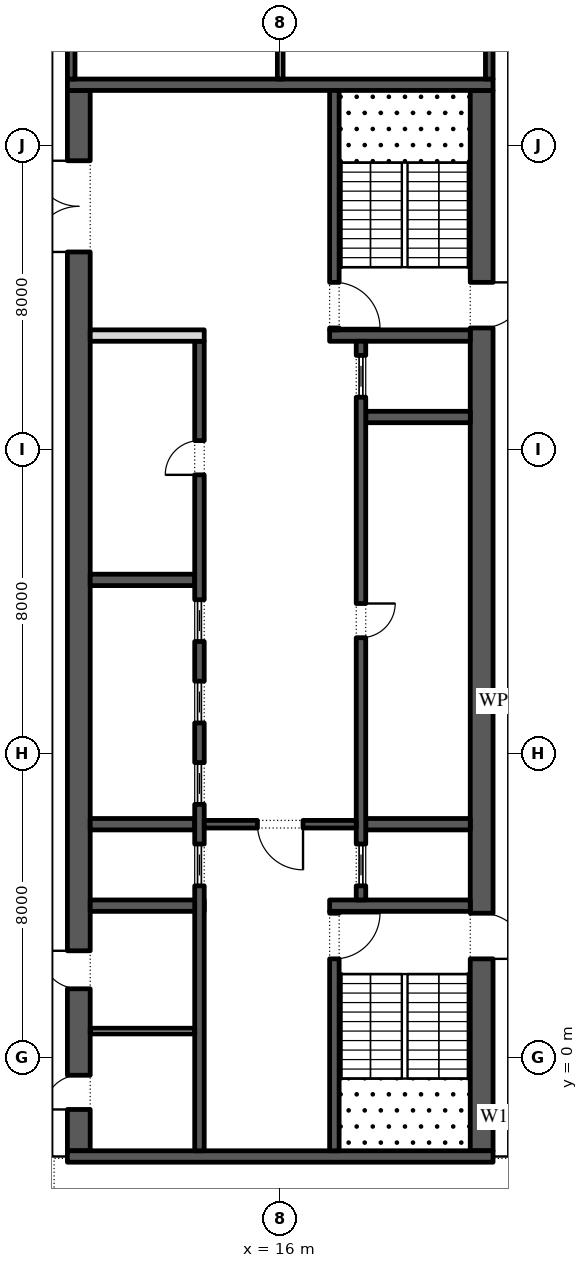
"""IFC4 building model, lengths in metres.
Left out: names, types, materials, properties, quantities, classifications, styles, units other than length and angle.
Written with IfcOpenShell. Run it as: python <this file> out.ifc"""

import sys

from ifc_helpers import new_model, si_unit, direction, frame, frame_2d, origin, place, context, subcontext, project, spatial, rectangle, extrude, element, fill, save


model = new_model("IFC4")
c1 = context("Model", 3, precision=1e-05, world=origin(), true_north=direction((0.0, 1.0)))
c2 = subcontext(c1, "Body", "Model", "MODEL_VIEW")
j1 = project(units=[si_unit("LENGTHUNIT", "METRE"), si_unit("PLANEANGLEUNIT", "RADIAN")], contexts=[c1])
p1 = place(None, origin())
s1 = spatial("IfcSite", under=j1, at=p1, CompositionType="ELEMENT")
p2 = place(p1, origin())
s2 = spatial("IfcBuilding", under=s1, at=p2, CompositionType="ELEMENT")
p3 = place(p2, frame((0.0, 0.0, 272.4)))
s3 = spatial("IfcBuildingStorey", under=s2, at=p3, CompositionType="ELEMENT", Elevation=272.4)
p4 = place(p3, frame((21.359, -11.678, 0.0), z_axis=(0.0, 0.0, 1.0), x_axis=(0.224949198343, 0.974370493275, 0.0)))
e1 = element("IfcWall", 1, at=p4, inside=s3, PredefinedType="STANDARD", context=c2, shape_type="SweptSolid", body=[
    extrude(rectangle(XDim=49.5, YDim=0.3, at=frame_2d((24.75, 0.0))), origin(), (0.0, 0.0, 1.0), 4.0),
])
p5 = place(p4, frame((1.157, 0.0, 0.45)))
e2 = element("IfcOpeningElement", 2, at=p5, cuts=e1, PredefinedType="OPENING", context=c2, shape_type="SweptSolid", body=[
    extrude(rectangle(XDim=4.5, YDim=3.05, at=frame_2d((2.25, 1.525))), frame((0.0, 0.16, 0.0), z_axis=(0.0, -1.0, 0.0), x_axis=(1.0, 0.0, 0.0)), (0.0, 0.0, 1.0), 0.32),
])
p6 = place(p4, frame((8.121, 0.0, 0.45)))
e3 = element("IfcOpeningElement", 3, at=p6, cuts=e1, PredefinedType="OPENING", context=c2, shape_type="SweptSolid", body=[
    extrude(rectangle(XDim=4.5, YDim=3.05, at=frame_2d((2.25, 1.525))), frame((0.0, 0.16, 0.0), z_axis=(0.0, -1.0, 0.0), x_axis=(1.0, 0.0, 0.0)), (0.0, 0.0, 1.0), 0.32),
])
p7 = place(p4, frame((15.236, 0.0, 0.45)))
e4 = element("IfcOpeningElement", 4, at=p7, cuts=e1, PredefinedType="OPENING", context=c2, shape_type="SweptSolid", body=[
    extrude(rectangle(XDim=4.5, YDim=3.05, at=frame_2d((2.25, 1.525))), frame((0.0, 0.16, 0.0), z_axis=(0.0, -1.0, 0.0), x_axis=(1.0, 0.0, 0.0)), (0.0, 0.0, 1.0), 0.32),
])
p8 = place(p4, frame((22.35, 0.0, 0.45)))
e5 = element("IfcOpeningElement", 5, at=p8, cuts=e1, PredefinedType="OPENING", context=c2, shape_type="SweptSolid", body=[
    extrude(rectangle(XDim=4.5, YDim=3.05, at=frame_2d((2.25, 1.525))), frame((0.0, 0.16, 0.0), z_axis=(0.0, -1.0, 0.0), x_axis=(1.0, 0.0, 0.0)), (0.0, 0.0, 1.0), 0.32),
])
p9 = place(p4, frame((29.464, 0.0, 0.45)))
e6 = element("IfcOpeningElement", 6, at=p9, cuts=e1, PredefinedType="OPENING", context=c2, shape_type="SweptSolid", body=[
    extrude(rectangle(XDim=4.5, YDim=2.95, at=frame_2d((2.25, 1.475))), frame((0.0, 0.16, 0.0), z_axis=(0.0, -1.0, 0.0), x_axis=(1.0, 0.0, 0.0)), (0.0, 0.0, 1.0), 0.32),
])
p10 = place(p4, frame((37.628, 0.0, 0.0)))
e7 = element("IfcOpeningElement", 7, at=p10, cuts=e1, PredefinedType="OPENING", context=c2, shape_type="SweptSolid", body=[
    extrude(rectangle(XDim=2.4, YDim=3.325, at=frame_2d((1.2, 1.663))), frame((0.0, 0.16, 0.0), z_axis=(0.0, -1.0, 0.0), x_axis=(1.0, 0.0, 0.0)), (0.0, 0.0, 1.0), 0.32),
])
p11 = place(p4, frame((43.693, 0.0, 0.45)))
e8 = element("IfcOpeningElement", 8, at=p11, cuts=e1, PredefinedType="OPENING", context=c2, shape_type="SweptSolid", body=[
    extrude(rectangle(XDim=4.5, YDim=3.05, at=frame_2d((2.25, 1.525))), frame((0.0, 0.16, 0.0), z_axis=(0.0, -1.0, 0.0), x_axis=(1.0, 0.0, 0.0)), (0.0, 0.0, 1.0), 0.32),
])
p12 = place(p3, frame((21.3, -2.45, 0.0), z_axis=(0.0, 0.0, 1.0), x_axis=(0.0, 1.0, 0.0)))
e9 = element("IfcWall", 9, at=p12, inside=s3, PredefinedType="SHEAR", context=c2, shape_type="SweptSolid", body=[
    extrude(rectangle(XDim=27.9, YDim=0.6, at=frame_2d((13.95, 0.0))), origin(), (0.0, 0.0, 1.0), 4.0),
])
p13 = place(p12, frame((5.05, 0.0, 0.0)))
e10 = element("IfcOpeningElement", 10, at=p13, cuts=e9, PredefinedType="OPENING", context=c2, shape_type="SweptSolid", body=[
    extrude(rectangle(XDim=1.2, YDim=2.1, at=frame_2d((0.6, 1.05))), frame((0.0, 0.31, 0.0), z_axis=(0.0, -1.0, 0.0), x_axis=(1.0, 0.0, 0.0)), (0.0, 0.0, 1.0), 0.62),
])
p14 = place(p12, frame((21.65, 0.0, 0.0)))
e11 = element("IfcOpeningElement", 11, at=p14, cuts=e9, PredefinedType="OPENING", context=c2, shape_type="SweptSolid", body=[
    extrude(rectangle(XDim=1.2, YDim=2.1, at=frame_2d((0.6, 1.05))), frame((0.0, 0.31, 0.0), z_axis=(0.0, -1.0, 0.0), x_axis=(1.0, 0.0, 0.0)), (0.0, 0.0, 1.0), 0.62),
])
p15 = place(p3, frame((10.7, -2.45, 0.0), z_axis=(0.0, 0.0, 1.0), x_axis=(0.0, 1.0, 0.0)))
e12 = element("IfcWall", 12, at=p15, inside=s3, PredefinedType="SHEAR", context=c2, shape_type="SweptSolid", body=[
    extrude(rectangle(XDim=27.9, YDim=0.6, at=frame_2d((13.95, 0.0))), origin(), (0.0, 0.0, 1.0), 4.0),
])
p16 = place(p15, frame((23.65, 0.0, 0.0)))
e13 = element("IfcOpeningElement", 13, at=p16, cuts=e12, PredefinedType="OPENING", context=c2, shape_type="SweptSolid", body=[
    extrude(rectangle(XDim=2.4, YDim=2.1, at=frame_2d((1.2, 1.05))), frame((0.0, 0.31, 0.0), z_axis=(0.0, -1.0, 0.0), x_axis=(1.0, 0.0, 0.0)), (0.0, 0.0, 1.0), 0.62),
])
p17 = place(p15, frame((1.087, 0.0, 0.0)))
e14 = element("IfcOpeningElement", 14, at=p17, cuts=e12, PredefinedType="OPENING", context=c2, shape_type="SweptSolid", body=[
    extrude(rectangle(XDim=0.9, YDim=2.1, at=frame_2d((0.45, 1.05))), frame((0.0, 0.31, 0.0), z_axis=(0.0, -1.0, 0.0), x_axis=(1.0, 0.0, 0.0)), (0.0, 0.0, 1.0), 0.62),
])
p18 = place(p15, frame((4.262, 0.0, 0.0)))
e15 = element("IfcOpeningElement", 15, at=p18, cuts=e12, PredefinedType="OPENING", context=c2, shape_type="SweptSolid", body=[
    extrude(rectangle(XDim=1.0, YDim=2.1, at=frame_2d((0.5, 1.05))), frame((0.0, 0.31, 0.0), z_axis=(0.0, -1.0, 0.0), x_axis=(1.0, 0.0, 0.0)), (0.0, 0.0, 1.0), 0.62),
])
for number, where, z_axis, x_axis in (
    (16, (10.4, -2.6, 0.0), (0.0, 0.0, 1.0), (1.0, 0.0, 0.0)),
    (17, (10.4, 25.6, 0.0), (0.0, 0.0, 1.0), (1.0, 0.0, 0.0)),
):
    element("IfcWall", number, at=place(p3, frame(where, z_axis=z_axis, x_axis=x_axis)), inside=s3, PredefinedType="SHEAR", context=c2, shape_type="SweptSolid", body=[
        extrude(rectangle(XDim=11.2, YDim=0.3, at=frame_2d((5.6, 0.0))), origin(), (0.0, 0.0, 1.0), 4.0),
    ])
p19 = place(p3, frame((17.3, 4.0, 0.0), z_axis=(0.0, 0.0, 1.0), x_axis=(1.0, 0.0, 0.0)))
e18 = element("IfcWall", 18, at=p19, inside=s3, PredefinedType="SHEAR", context=c2, shape_type="SweptSolid", body=[
    extrude(rectangle(XDim=3.7, YDim=0.3, at=frame_2d((1.85, 0.0))), origin(), (0.0, 0.0, 1.0), 4.0),
])
p20 = place(p3, frame((17.425, -2.45, 0.0), z_axis=(0.0, 0.0, 1.0), x_axis=(0.0, 1.0, 0.0)))
e19 = element("IfcWall", 19, at=p20, inside=s3, PredefinedType="SHEAR", context=c2, shape_type="SweptSolid", body=[
    extrude(rectangle(XDim=6.3, YDim=0.25, at=frame_2d((3.15, 0.0))), origin(), (0.0, 0.0, 1.0), 4.0),
])
p21 = place(p20, frame((5.05, 0.0, 0.0)))
e20 = element("IfcOpeningElement", 20, at=p21, cuts=e19, PredefinedType="OPENING", context=c2, shape_type="SweptSolid", body=[
    extrude(rectangle(XDim=1.2, YDim=2.1, at=frame_2d((0.6, 1.05))), frame((0.0, 0.135, 0.0), z_axis=(0.0, -1.0, 0.0), x_axis=(1.0, 0.0, 0.0)), (0.0, 0.0, 1.0), 0.27),
])
p22 = place(p3, frame((17.3, 19.0, 0.0), z_axis=(0.0, 0.0, 1.0), x_axis=(1.0, 0.0, 0.0)))
e21 = element("IfcWall", 21, at=p22, inside=s3, PredefinedType="SHEAR", context=c2, shape_type="SweptSolid", body=[
    extrude(rectangle(XDim=3.7, YDim=0.3, at=frame_2d((1.85, 0.0))), origin(), (0.0, 0.0, 1.0), 4.0),
])
p23 = place(p3, frame((17.425, 19.15, 0.0), z_axis=(0.0, 0.0, 1.0), x_axis=(0.0, 1.0, 0.0)))
e22 = element("IfcWall", 22, at=p23, inside=s3, PredefinedType="SHEAR", context=c2, shape_type="SweptSolid", body=[
    extrude(rectangle(XDim=6.3, YDim=0.25, at=frame_2d((3.15, 0.0))), origin(), (0.0, 0.0, 1.0), 4.0),
])
p24 = place(p23, frame((0.05, 0.0, 0.0)))
e23 = element("IfcOpeningElement", 23, at=p24, cuts=e22, PredefinedType="OPENING", context=c2, shape_type="SweptSolid", body=[
    extrude(rectangle(XDim=1.2, YDim=2.1, at=frame_2d((0.6, 1.05))), frame((0.0, 0.135, 0.0), z_axis=(0.0, -1.0, 0.0), x_axis=(1.0, 0.0, 0.0)), (0.0, 0.0, 1.0), 0.27),
])
for number, where, z_axis, x_axis in (
    (24, (18.25, 6.143, 0.0), (0.0, 0.0, 1.0), (1.0, 0.0, 0.0)),
    (25, (18.25, 16.857, 0.0), (0.0, 0.0, 1.0), (1.0, 0.0, 0.0)),
):
    element("IfcWall", number, at=place(p3, frame(where, z_axis=z_axis, x_axis=x_axis)), inside=s3, PredefinedType="SHEAR", context=c2, shape_type="SweptSolid", body=[
        extrude(rectangle(XDim=2.75, YDim=0.3, at=frame_2d((1.375, 0.0))), origin(), (0.0, 0.0, 1.0), 4.0),
    ])
p25 = place(p3, frame((18.125, 4.15, 0.0), z_axis=(0.0, 0.0, 1.0), x_axis=(0.0, 1.0, 0.0)))
e26 = element("IfcWall", 26, at=p25, inside=s3, PredefinedType="SHEAR", context=c2, shape_type="SweptSolid", body=[
    extrude(rectangle(XDim=14.7, YDim=0.25, at=frame_2d((7.35, 0.0))), origin(), (0.0, 0.0, 1.0), 4.0),
])
p26 = place(p25, frame((6.9, 0.0, 0.0)))
e27 = element("IfcOpeningElement", 27, at=p26, cuts=e26, PredefinedType="OPENING", context=c2, shape_type="SweptSolid", body=[
    extrude(rectangle(XDim=0.9, YDim=2.1, at=frame_2d((0.45, 1.05))), frame((0.0, 0.135, 0.0), z_axis=(0.0, -1.0, 0.0), x_axis=(1.0, 0.0, 0.0)), (0.0, 0.0, 1.0), 0.27),
])
p27 = place(p25, frame((0.371, 0.0, 0.0)))
e28 = element("IfcOpeningElement", 28, at=p27, cuts=e26, PredefinedType="OPENING", context=c2, shape_type="SweptSolid", body=[
    extrude(rectangle(XDim=1.1, YDim=2.1, at=frame_2d((0.55, 1.05))), frame((0.0, 0.135, 0.0), z_axis=(0.0, -1.0, 0.0), x_axis=(1.0, 0.0, 0.0)), (0.0, 0.0, 1.0), 0.27),
])
p28 = place(p25, frame((13.229, 0.0, 0.0)))
e29 = element("IfcOpeningElement", 29, at=p28, cuts=e26, PredefinedType="OPENING", context=c2, shape_type="SweptSolid", body=[
    extrude(rectangle(XDim=1.1, YDim=2.1, at=frame_2d((0.55, 1.05))), frame((0.0, 0.135, 0.0), z_axis=(0.0, -1.0, 0.0), x_axis=(1.0, 0.0, 0.0)), (0.0, 0.0, 1.0), 0.27),
])
p29 = place(p3, frame((11.0, 4.0, 0.0), z_axis=(0.0, 0.0, 1.0), x_axis=(1.0, 0.0, 0.0)))
e30 = element("IfcWall", 30, at=p29, inside=s3, PredefinedType="SHEAR", context=c2, shape_type="SweptSolid", body=[
    extrude(rectangle(XDim=3.0, YDim=0.3, at=frame_2d((1.5, 0.0))), origin(), (0.0, 0.0, 1.0), 4.0),
])
for number, where, z_axis, x_axis in (
    (31, (11.0, 6.143, 0.0), (0.0, 0.0, 1.0), (1.0, 0.0, 0.0)),
    (32, (11.0, 12.571, 0.0), (0.0, 0.0, 1.0), (1.0, 0.0, 0.0)),
):
    element("IfcWall", number, at=place(p3, frame(where, z_axis=z_axis, x_axis=x_axis)), inside=s3, PredefinedType="SHEAR", context=c2, shape_type="SweptSolid", body=[
        extrude(rectangle(XDim=2.75, YDim=0.3, at=frame_2d((1.375, 0.0))), origin(), (0.0, 0.0, 1.0), 4.0),
    ])
p30 = place(p3, frame((13.875, -2.45, 0.0), z_axis=(0.0, 0.0, 1.0), x_axis=(0.0, 1.0, 0.0)))
e33 = element("IfcWall", 33, at=p30, inside=s3, PredefinedType="SHEAR", context=c2, shape_type="SweptSolid", body=[
    extrude(rectangle(XDim=21.3, YDim=0.25, at=frame_2d((10.65, 0.0))), origin(), (0.0, 0.0, 1.0), 4.0),
])
p31 = place(p30, frame((17.786, 0.0, 0.0)))
e34 = element("IfcOpeningElement", 34, at=p31, cuts=e33, PredefinedType="OPENING", context=c2, shape_type="SweptSolid", body=[
    extrude(rectangle(XDim=0.9, YDim=2.1, at=frame_2d((0.45, 1.05))), frame((0.0, 0.135, 0.0), z_axis=(0.0, -1.0, 0.0), x_axis=(1.0, 0.0, 0.0)), (0.0, 0.0, 1.0), 0.27),
])
p32 = place(p30, frame((6.971, 0.0, 0.0)))
e35 = element("IfcOpeningElement", 35, at=p32, cuts=e33, PredefinedType="OPENING", context=c2, shape_type="SweptSolid", body=[
    extrude(rectangle(XDim=1.1, YDim=2.1, at=frame_2d((0.55, 1.05))), frame((0.0, 0.135, 0.0), z_axis=(0.0, -1.0, 0.0), x_axis=(1.0, 0.0, 0.0)), (0.0, 0.0, 1.0), 0.27),
])
p33 = place(p30, frame((9.114, 0.0, 0.0)))
e36 = element("IfcOpeningElement", 36, at=p33, cuts=e33, PredefinedType="OPENING", context=c2, shape_type="SweptSolid", body=[
    extrude(rectangle(XDim=1.1, YDim=2.1, at=frame_2d((0.55, 1.05))), frame((0.0, 0.135, 0.0), z_axis=(0.0, -1.0, 0.0), x_axis=(1.0, 0.0, 0.0)), (0.0, 0.0, 1.0), 0.27),
])
p34 = place(p30, frame((11.257, 0.0, 0.0)))
e37 = element("IfcOpeningElement", 37, at=p34, cuts=e33, PredefinedType="OPENING", context=c2, shape_type="SweptSolid", body=[
    extrude(rectangle(XDim=1.1, YDim=2.1, at=frame_2d((0.55, 1.05))), frame((0.0, 0.135, 0.0), z_axis=(0.0, -1.0, 0.0), x_axis=(1.0, 0.0, 0.0)), (0.0, 0.0, 1.0), 0.27),
])
p35 = place(p30, frame((13.4, 0.0, 0.0)))
e38 = element("IfcOpeningElement", 38, at=p35, cuts=e33, PredefinedType="OPENING", context=c2, shape_type="SweptSolid", body=[
    extrude(rectangle(XDim=1.1, YDim=2.1, at=frame_2d((0.55, 1.05))), frame((0.0, 0.135, 0.0), z_axis=(0.0, -1.0, 0.0), x_axis=(1.0, 0.0, 0.0)), (0.0, 0.0, 1.0), 0.27),
])
p36 = place(p3, frame((11.0, 19.0, 0.0), z_axis=(0.0, 0.0, 1.0), x_axis=(1.0, 0.0, 0.0)))
e39 = element("IfcWall", 39, at=p36, inside=s3, PredefinedType="PARTITIONING", context=c2, shape_type="SweptSolid", body=[
    extrude(rectangle(XDim=3.0, YDim=0.3, at=frame_2d((1.5, 0.0))), origin(), (0.0, 0.0, 1.0), 4.0),
])
p37 = place(p3, frame((14.0, 6.143, 0.0), z_axis=(0.0, 0.0, 1.0), x_axis=(1.0, 0.0, 0.0)))
e40 = element("IfcWall", 40, at=p37, inside=s3, PredefinedType="SHEAR", context=c2, shape_type="SweptSolid", body=[
    extrude(rectangle(XDim=4.0, YDim=0.2, at=frame_2d((2.0, 0.0))), origin(), (0.0, 0.0, 1.0), 4.0),
])
p38 = place(p37, frame((1.4, 0.0, 0.0)))
e41 = element("IfcOpeningElement", 41, at=p38, cuts=e40, PredefinedType="OPENING", context=c2, shape_type="SweptSolid", body=[
    extrude(rectangle(XDim=1.2, YDim=2.1, at=frame_2d((0.6, 1.05))), frame((0.0, 0.11, 0.0), z_axis=(0.0, -1.0, 0.0), x_axis=(1.0, 0.0, 0.0)), (0.0, 0.0, 1.0), 0.22),
])
p39 = place(p3, frame((11.0, 0.7, 0.0), z_axis=(0.0, 0.0, 1.0), x_axis=(1.0, 0.0, 0.0)))
e42 = element("IfcWall", 42, at=p39, inside=s3, PredefinedType="PARTITIONING", context=c2, shape_type="SweptSolid", body=[
    extrude(rectangle(XDim=2.75, YDim=0.15, at=frame_2d((1.375, 0.0))), origin(), (0.0, 0.0, 1.0), 4.0),
])
p40 = place(p3, frame((21.5, 25.75, 0.0), z_axis=(0.0, 0.0, 1.0), x_axis=(0.0, 1.0, 0.0)))
e43 = element("IfcWall", 43, at=p40, inside=s3, PredefinedType="SHEAR", context=c2, shape_type="SweptSolid", body=[
    extrude(rectangle(XDim=4.75, YDim=0.2, at=frame_2d((2.375, 0.0))), origin(), (0.0, 0.0, 1.0), 4.0),
])
p41 = place(p40, frame((1.925, 0.0, 0.0)))
e44 = element("IfcOpeningElement", 44, at=p41, cuts=e43, PredefinedType="OPENING", context=c2, shape_type="SweptSolid", body=[
    extrude(rectangle(XDim=0.9, YDim=2.1, at=frame_2d((0.45, 1.05))), frame((0.0, 0.11, 0.0), z_axis=(0.0, -1.0, 0.0), x_axis=(1.0, 0.0, 0.0)), (0.0, 0.0, 1.0), 0.22),
])
p42 = place(p3, frame((10.5, 25.75, 0.0), z_axis=(0.0, 0.0, 1.0), x_axis=(0.0, 1.0, 0.0)))
e45 = element("IfcWall", 45, at=p42, inside=s3, PredefinedType="SHEAR", context=c2, shape_type="SweptSolid", body=[
    extrude(rectangle(XDim=4.75, YDim=0.2, at=frame_2d((2.375, 0.0))), origin(), (0.0, 0.0, 1.0), 4.0),
])
p43 = place(p42, frame((1.925, 0.0, 0.0)))
e46 = element("IfcOpeningElement", 46, at=p43, cuts=e45, PredefinedType="OPENING", context=c2, shape_type="SweptSolid", body=[
    extrude(rectangle(XDim=0.9, YDim=2.1, at=frame_2d((0.45, 1.05))), frame((0.0, 0.11, 0.0), z_axis=(0.0, -1.0, 0.0), x_axis=(1.0, 0.0, 0.0)), (0.0, 0.0, 1.0), 0.22),
])
p44 = place(p3, frame((16.0, 25.75, 0.0), z_axis=(0.0, 0.0, 1.0), x_axis=(0.0, 1.0, 0.0)))
e47 = element("IfcWall", 47, at=p44, inside=s3, PredefinedType="PARTITIONING", context=c2, shape_type="SweptSolid", body=[
    extrude(rectangle(XDim=4.75, YDim=0.15, at=frame_2d((2.375, 0.0))), origin(), (0.0, 0.0, 1.0), 4.0),
])
p45 = place(p26, frame((0.9, -0.2, 0.0), z_axis=(0.0, 0.0, 1.0), x_axis=(-1.0, 0.0, 0.0)))
e48 = element("IfcDoor", 48, at=p45, inside=s3, OperationType="SINGLE_SWING_RIGHT", PredefinedType="DOOR", context=c2, shape_type="SweptSolid", body=[
    extrude(rectangle(XDim=0.9, YDim=2.1, at=frame_2d((0.45, 1.05))), frame((0.0, -0.075, 0.0), z_axis=(0.0, -1.0, 0.0), x_axis=(1.0, 0.0, 0.0)), (0.0, 0.0, 1.0), 0.05),
])
fill(e27, e48)
p46 = place(p27, origin())
e49 = element("IfcDoor", 49, at=p46, inside=s3, OperationType="SLIDING_TO_LEFT", PredefinedType="DOOR", context=c2, shape_type="SweptSolid", body=[
    extrude(rectangle(XDim=1.1, YDim=2.1, at=frame_2d((0.55, 1.05))), frame((0.0, 0.025, 0.0), z_axis=(0.0, -1.0, 0.0), x_axis=(1.0, 0.0, 0.0)), (0.0, 0.0, 1.0), 0.05),
])
fill(e28, e49)
p47 = place(p28, origin())
e50 = element("IfcDoor", 50, at=p47, inside=s3, OperationType="SLIDING_TO_LEFT", PredefinedType="DOOR", context=c2, shape_type="SweptSolid", body=[
    extrude(rectangle(XDim=1.1, YDim=2.1, at=frame_2d((0.55, 1.05))), frame((0.0, 0.025, 0.0), z_axis=(0.0, -1.0, 0.0), x_axis=(1.0, 0.0, 0.0)), (0.0, 0.0, 1.0), 0.05),
])
fill(e29, e50)
p48 = place(p31, origin())
e51 = element("IfcDoor", 51, at=p48, inside=s3, OperationType="SINGLE_SWING_RIGHT", PredefinedType="DOOR", context=c2, shape_type="SweptSolid", body=[
    extrude(rectangle(XDim=0.9, YDim=2.1, at=frame_2d((0.45, 1.05))), frame((0.0, 0.125, 0.0), z_axis=(0.0, -1.0, 0.0), x_axis=(1.0, 0.0, 0.0)), (0.0, 0.0, 1.0), 0.05),
])
fill(e34, e51)
p49 = place(p32, origin())
e52 = element("IfcDoor", 52, at=p49, inside=s3, OperationType="SLIDING_TO_LEFT", PredefinedType="DOOR", context=c2, shape_type="SweptSolid", body=[
    extrude(rectangle(XDim=1.1, YDim=2.1, at=frame_2d((0.55, 1.05))), frame((0.0, 0.025, 0.0), z_axis=(0.0, -1.0, 0.0), x_axis=(1.0, 0.0, 0.0)), (0.0, 0.0, 1.0), 0.05),
])
fill(e35, e52)
p50 = place(p33, origin())
e53 = element("IfcDoor", 53, at=p50, inside=s3, OperationType="SLIDING_TO_LEFT", PredefinedType="DOOR", context=c2, shape_type="SweptSolid", body=[
    extrude(rectangle(XDim=1.1, YDim=2.1, at=frame_2d((0.55, 1.05))), frame((0.0, 0.025, 0.0), z_axis=(0.0, -1.0, 0.0), x_axis=(1.0, 0.0, 0.0)), (0.0, 0.0, 1.0), 0.05),
])
fill(e36, e53)
p51 = place(p34, origin())
e54 = element("IfcDoor", 54, at=p51, inside=s3, OperationType="SLIDING_TO_LEFT", PredefinedType="DOOR", context=c2, shape_type="SweptSolid", body=[
    extrude(rectangle(XDim=1.1, YDim=2.1, at=frame_2d((0.55, 1.05))), frame((0.0, 0.025, 0.0), z_axis=(0.0, -1.0, 0.0), x_axis=(1.0, 0.0, 0.0)), (0.0, 0.0, 1.0), 0.05),
])
fill(e37, e54)
p52 = place(p35, origin())
e55 = element("IfcDoor", 55, at=p52, inside=s3, OperationType="SLIDING_TO_LEFT", PredefinedType="DOOR", context=c2, shape_type="SweptSolid", body=[
    extrude(rectangle(XDim=1.1, YDim=2.1, at=frame_2d((0.55, 1.05))), frame((0.0, 0.025, 0.0), z_axis=(0.0, -1.0, 0.0), x_axis=(1.0, 0.0, 0.0)), (0.0, 0.0, 1.0), 0.05),
])
fill(e38, e55)
p53 = place(p38, frame((1.2, 0.0, 0.0), z_axis=(0.0, 0.0, 1.0), x_axis=(-1.0, 0.0, 0.0)))
e56 = element("IfcDoor", 56, at=p53, inside=s3, OperationType="SINGLE_SWING_RIGHT", PredefinedType="DOOR", context=c2, shape_type="SweptSolid", body=[
    extrude(rectangle(XDim=1.2, YDim=2.1, at=frame_2d((0.6, 1.05))), frame((0.0, 0.025, 0.0), z_axis=(0.0, -1.0, 0.0), x_axis=(1.0, 0.0, 0.0)), (0.0, 0.0, 1.0), 0.05),
])
fill(e41, e56)
p54 = place(p16, origin())
e57 = element("IfcDoor", 57, at=p54, inside=s3, OperationType="DOUBLE_DOOR_SINGLE_SWING", PredefinedType="DOOR", context=c2, shape_type="SweptSolid", body=[
    extrude(rectangle(XDim=2.4, YDim=2.1, at=frame_2d((1.2, 1.05))), frame((0.0, 0.025, 0.0), z_axis=(0.0, -1.0, 0.0), x_axis=(1.0, 0.0, 0.0)), (0.0, 0.0, 1.0), 0.05),
])
fill(e13, e57)
p55 = place(p21, frame((1.2, 0.0, 0.0), z_axis=(0.0, 0.0, 1.0), x_axis=(-1.0, 0.0, 0.0)))
e58 = element("IfcDoor", 58, at=p55, inside=s3, OperationType="SINGLE_SWING_RIGHT", PredefinedType="DOOR", context=c2, shape_type="SweptSolid", body=[
    extrude(rectangle(XDim=1.2, YDim=2.1, at=frame_2d((0.6, 1.05))), frame((0.0, 0.025, 0.0), z_axis=(0.0, -1.0, 0.0), x_axis=(1.0, 0.0, 0.0)), (0.0, 0.0, 1.0), 0.05),
])
fill(e20, e58)
p56 = place(p13, frame((1.2, 0.0, 0.0), z_axis=(0.0, 0.0, 1.0), x_axis=(-1.0, 0.0, 0.0)))
e59 = element("IfcDoor", 59, at=p56, inside=s3, OperationType="SINGLE_SWING_LEFT", PredefinedType="DOOR", context=c2, shape_type="SweptSolid", body=[
    extrude(rectangle(XDim=1.2, YDim=2.1, at=frame_2d((0.6, 1.05))), frame((0.0, 0.025, 0.0), z_axis=(0.0, -1.0, 0.0), x_axis=(1.0, 0.0, 0.0)), (0.0, 0.0, 1.0), 0.05),
])
fill(e10, e59)
p57 = place(p24, frame((1.2, 0.0, 0.0), z_axis=(0.0, 0.0, 1.0), x_axis=(-1.0, 0.0, 0.0)))
e60 = element("IfcDoor", 60, at=p57, inside=s3, OperationType="SINGLE_SWING_LEFT", PredefinedType="DOOR", context=c2, shape_type="SweptSolid", body=[
    extrude(rectangle(XDim=1.2, YDim=2.1, at=frame_2d((0.6, 1.05))), frame((0.0, 0.025, 0.0), z_axis=(0.0, -1.0, 0.0), x_axis=(1.0, 0.0, 0.0)), (0.0, 0.0, 1.0), 0.05),
])
fill(e23, e60)
p58 = place(p14, frame((1.2, 0.0, 0.0), z_axis=(0.0, 0.0, 1.0), x_axis=(-1.0, 0.0, 0.0)))
e61 = element("IfcDoor", 61, at=p58, inside=s3, OperationType="SINGLE_SWING_RIGHT", PredefinedType="DOOR", context=c2, shape_type="SweptSolid", body=[
    extrude(rectangle(XDim=1.2, YDim=2.1, at=frame_2d((0.6, 1.05))), frame((0.0, 0.025, 0.0), z_axis=(0.0, -1.0, 0.0), x_axis=(1.0, 0.0, 0.0)), (0.0, 0.0, 1.0), 0.05),
])
fill(e11, e61)
p59 = place(p17, origin())
e62 = element("IfcDoor", 62, at=p59, inside=s3, OperationType="SINGLE_SWING_RIGHT", PredefinedType="DOOR", context=c2, shape_type="SweptSolid", body=[
    extrude(rectangle(XDim=0.9, YDim=2.1, at=frame_2d((0.45, 1.05))), frame((0.0, -0.25, 0.0), z_axis=(0.0, -1.0, 0.0), x_axis=(1.0, 0.0, 0.0)), (0.0, 0.0, 1.0), 0.05),
])
fill(e14, e62)
p60 = place(p18, origin())
e63 = element("IfcDoor", 63, at=p60, inside=s3, OperationType="SINGLE_SWING_LEFT", PredefinedType="DOOR", context=c2, shape_type="SweptSolid", body=[
    extrude(rectangle(XDim=1.0, YDim=2.1, at=frame_2d((0.5, 1.05))), frame((0.0, -0.25, 0.0), z_axis=(0.0, -1.0, 0.0), x_axis=(1.0, 0.0, 0.0)), (0.0, 0.0, 1.0), 0.05),
])
fill(e15, e63)
save(model, sys.argv[1])
